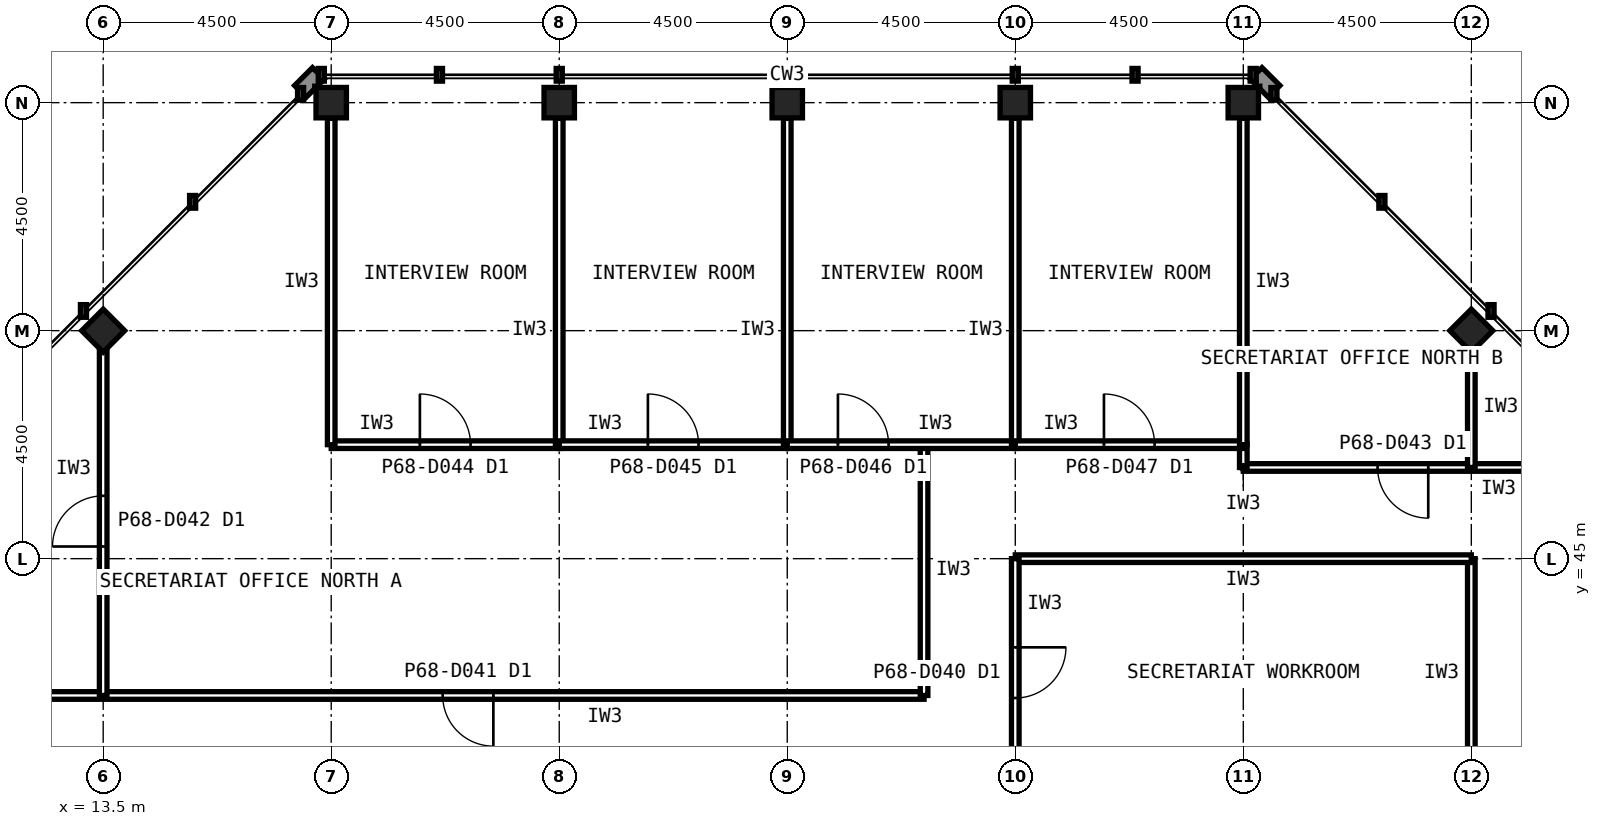
"""IFC4 building model, lengths in metres.
Left out: names, types, materials, properties, quantities, classifications, styles, units other than length and angle.
Written with IfcOpenShell. Run it as: python <this file> out.ifc"""

import sys

from ifc_helpers import new_model, si_unit, direction, frame, frame_2d, origin, origin_2d, place, context, subcontext, project, spatial, rectangle, hollow_rectangle, extrude, element, fill, save


model = new_model("IFC4")
c1 = context("Model", 3, precision=1e-05, world=origin(), true_north=direction((0.0, 1.0)))
c2 = subcontext(c1, "Body", "Model", "MODEL_VIEW")
j1 = project(units=[si_unit("LENGTHUNIT", "METRE"), si_unit("PLANEANGLEUNIT", "RADIAN")], contexts=[c1])
p1 = place(None, origin())
s1 = spatial("IfcSite", under=j1, at=p1, CompositionType="ELEMENT")
p2 = place(p1, origin())
s2 = spatial("IfcBuilding", under=s1, at=p2, CompositionType="ELEMENT")
p3 = place(p2, frame((0.0, 0.0, 286.6)))
s3 = spatial("IfcBuildingStorey", under=s2, at=p3, CompositionType="ELEMENT", Elevation=286.6)
for number, where, z_axis, x_axis in (
    (1, (36.0, 54.0, 0.0), (0.0, 0.0, 1.0), (1.0, 0.0, 0.0)),
    (2, (31.5, 54.0, 0.0), (0.0, 0.0, 1.0), (1.0, 0.0, 0.0)),
    (3, (27.0, 54.0, 0.0), (0.0, 0.0, 1.0), (1.0, 0.0, 0.0)),
    (4, (22.5, 54.0, 0.0), (0.0, 0.0, 1.0), (1.0, 0.0, 0.0)),
    (5, (18.0, 54.0, 0.0), (0.0, 0.0, 1.0), (1.0, 0.0, 0.0)),
    (6, (40.5, 49.5, 0.0), (0.0, 0.0, 1.0), (0.707, 0.707, 0.0)),
    (7, (13.5, 49.5, 0.0), (0.0, 0.0, 1.0), (0.707, 0.707, 0.0)),
):
    element("IfcColumn", number, at=place(p3, frame(where, z_axis=z_axis, x_axis=x_axis)), inside=s3, PredefinedType="COLUMN", context=c2, shape_type="SweptSolid", body=[
        extrude(hollow_rectangle(XDim=0.6, YDim=0.6, WallThickness=0.028, at=origin_2d()), origin(), (0.0, 0.0, 1.0), 4.0),
    ])
p4 = place(p3, frame((29.7, 42.3, 0.0), z_axis=(0.0, 0.0, 1.0), x_axis=(-1.0, 0.0, 0.0)))
e8 = element("IfcWall", 8, at=p4, inside=s3, PredefinedType="PARTITIONING", context=c2, shape_type="SweptSolid", body=[
    extrude(rectangle(XDim=18.0, YDim=0.15, at=frame_2d((9.0, 0.0))), origin(), (0.0, 0.0, 1.0), 3.84),
])
p5 = place(p4, frame((8.5, 0.0, 0.0)))
e9 = element("IfcOpeningElement", 9, at=p5, cuts=e8, PredefinedType="OPENING", context=c2, shape_type="SweptSolid", body=[
    extrude(rectangle(XDim=1.0, YDim=2.1, at=frame_2d((0.5, 1.05))), frame((0.0, 0.085, 0.0), z_axis=(0.0, -1.0, 0.0), x_axis=(1.0, 0.0, 0.0)), (0.0, 0.0, 1.0), 0.17),
])
p6 = place(p3, frame((29.7, 47.25, 0.0), z_axis=(0.0, 0.0, 1.0), x_axis=(0.0, -1.0, 0.0)))
e10 = element("IfcWall", 10, at=p6, inside=s3, PredefinedType="PARTITIONING", context=c2, shape_type="SweptSolid", body=[
    extrude(rectangle(XDim=4.95, YDim=0.15, at=frame_2d((2.475, 0.0))), origin(), (0.0, 0.0, 1.0), 3.84),
])
p7 = place(p3, frame((42.3, 46.8, 0.0), z_axis=(0.0, 0.0, 1.0), x_axis=(-1.0, 0.0, 0.0)))
e11 = element("IfcWall", 11, at=p7, inside=s3, PredefinedType="PARTITIONING", context=c2, shape_type="SweptSolid", body=[
    extrude(rectangle(XDim=6.3, YDim=0.15, at=frame_2d((3.15, 0.0))), origin(), (0.0, 0.0, 1.0), 3.84),
])
p8 = place(p7, frame((2.65, 0.0, 0.0)))
e12 = element("IfcOpeningElement", 12, at=p8, cuts=e11, PredefinedType="OPENING", context=c2, shape_type="SweptSolid", body=[
    extrude(rectangle(XDim=1.0, YDim=2.1, at=frame_2d((0.5, 1.05))), frame((0.0, 0.085, 0.0), z_axis=(0.0, -1.0, 0.0), x_axis=(1.0, 0.0, 0.0)), (0.0, 0.0, 1.0), 0.17),
])
p9 = place(p3, frame((36.0, 46.8, 0.0), z_axis=(0.0, 0.0, 1.0), x_axis=(0.0, 1.0, 0.0)))
e13 = element("IfcWall", 13, at=p9, inside=s3, PredefinedType="PARTITIONING", context=c2, shape_type="SweptSolid", body=[
    extrude(rectangle(XDim=0.46, YDim=0.15, at=frame_2d((0.23, 0.0))), origin(), (0.0, 0.0, 1.0), 2.989),
])
p10 = place(p3, frame((40.5, 40.5, 0.0), z_axis=(0.0, 0.0, 1.0), x_axis=(0.0, 1.0, 0.0)))
e14 = element("IfcWall", 14, at=p10, inside=s3, PredefinedType="PARTITIONING", context=c2, shape_type="SweptSolid", body=[
    extrude(rectangle(XDim=4.5, YDim=0.15, at=frame_2d((2.25, 0.0))), origin(), (0.0, 0.0, 1.0), 2.989),
])
p11 = place(p3, frame((40.5, 45.0, 0.0), z_axis=(0.0, 0.0, 1.0), x_axis=(-1.0, 0.0, 0.0)))
e15 = element("IfcWall", 15, at=p11, inside=s3, PredefinedType="PARTITIONING", context=c2, shape_type="SweptSolid", body=[
    extrude(rectangle(XDim=9.0, YDim=0.15, at=frame_2d((4.5, 0.0))), origin(), (0.0, 0.0, 1.0), 3.84),
])
p12 = place(p3, frame((31.5, 45.0, 0.0), z_axis=(0.0, 0.0, 1.0), x_axis=(0.0, -1.0, 0.0)))
e16 = element("IfcWall", 16, at=p12, inside=s3, PredefinedType="PARTITIONING", context=c2, shape_type="SweptSolid", body=[
    extrude(rectangle(XDim=4.5, YDim=0.15, at=frame_2d((2.25, 0.0))), origin(), (0.0, 0.0, 1.0), 2.989),
])
p13 = place(p12, frame((1.75, 0.0, 0.0)))
e17 = element("IfcOpeningElement", 17, at=p13, cuts=e16, PredefinedType="OPENING", context=c2, shape_type="SweptSolid", body=[
    extrude(rectangle(XDim=1.0, YDim=2.1, at=frame_2d((0.5, 1.05))), frame((0.0, 0.085, 0.0), z_axis=(0.0, -1.0, 0.0), x_axis=(1.0, 0.0, 0.0)), (0.0, 0.0, 1.0), 0.17),
])
p14 = place(p3, frame((18.0, 47.25, 0.0), z_axis=(0.0, 0.0, 1.0), x_axis=(1.0, 0.0, 0.0)))
e18 = element("IfcWall", 18, at=p14, inside=s3, PredefinedType="PARTITIONING", context=c2, shape_type="SweptSolid", body=[
    extrude(rectangle(XDim=4.5, YDim=0.15, at=frame_2d((2.25, 0.0))), origin(), (0.0, 0.0, 1.0), 3.84),
])
p15 = place(p14, frame((1.75, 0.0, 0.0)))
e19 = element("IfcOpeningElement", 19, at=p15, cuts=e18, PredefinedType="OPENING", context=c2, shape_type="SweptSolid", body=[
    extrude(rectangle(XDim=1.0, YDim=2.1, at=frame_2d((0.5, 1.05))), frame((0.0, 0.085, 0.0), z_axis=(0.0, -1.0, 0.0), x_axis=(1.0, 0.0, 0.0)), (0.0, 0.0, 1.0), 0.17),
])
for number, where, z_axis, x_axis in (
    (20, (22.5, 47.25, 0.0), (0.0, 0.0, 1.0), (0.0, 1.0, 0.0)),
    (21, (18.0, 53.69, 0.0), (0.0, 0.0, 1.0), (0.0, -1.0, 0.0)),
):
    element("IfcWall", number, at=place(p3, frame(where, z_axis=z_axis, x_axis=x_axis)), inside=s3, PredefinedType="PARTITIONING", context=c2, shape_type="SweptSolid", body=[
        extrude(rectangle(XDim=6.44, YDim=0.15, at=frame_2d((3.22, 0.0))), origin(), (0.0, 0.0, 1.0), 2.989),
    ])
p16 = place(p3, frame((22.5, 47.25, 0.0), z_axis=(0.0, 0.0, 1.0), x_axis=(1.0, 0.0, 0.0)))
e22 = element("IfcWall", 22, at=p16, inside=s3, PredefinedType="PARTITIONING", context=c2, shape_type="SweptSolid", body=[
    extrude(rectangle(XDim=4.5, YDim=0.15, at=frame_2d((2.25, 0.0))), origin(), (0.0, 0.0, 1.0), 3.84),
])
p17 = place(p16, frame((1.75, 0.0, 0.0)))
e23 = element("IfcOpeningElement", 23, at=p17, cuts=e22, PredefinedType="OPENING", context=c2, shape_type="SweptSolid", body=[
    extrude(rectangle(XDim=1.0, YDim=2.1, at=frame_2d((0.5, 1.05))), frame((0.0, 0.085, 0.0), z_axis=(0.0, -1.0, 0.0), x_axis=(1.0, 0.0, 0.0)), (0.0, 0.0, 1.0), 0.17),
])
p18 = place(p3, frame((27.0, 47.25, 0.0), z_axis=(0.0, 0.0, 1.0), x_axis=(0.0, 1.0, 0.0)))
e24 = element("IfcWall", 24, at=p18, inside=s3, PredefinedType="PARTITIONING", context=c2, shape_type="SweptSolid", body=[
    extrude(rectangle(XDim=6.44, YDim=0.15, at=frame_2d((3.22, 0.0))), origin(), (0.0, 0.0, 1.0), 2.989),
])
p19 = place(p3, frame((27.0, 47.25, 0.0), z_axis=(0.0, 0.0, 1.0), x_axis=(1.0, 0.0, 0.0)))
e25 = element("IfcWall", 25, at=p19, inside=s3, PredefinedType="PARTITIONING", context=c2, shape_type="SweptSolid", body=[
    extrude(rectangle(XDim=4.5, YDim=0.15, at=frame_2d((2.25, 0.0))), origin(), (0.0, 0.0, 1.0), 3.84),
])
p20 = place(p19, frame((1.0, 0.0, 0.0)))
e26 = element("IfcOpeningElement", 26, at=p20, cuts=e25, PredefinedType="OPENING", context=c2, shape_type="SweptSolid", body=[
    extrude(rectangle(XDim=1.0, YDim=2.1, at=frame_2d((0.5, 1.05))), frame((0.0, 0.085, 0.0), z_axis=(0.0, -1.0, 0.0), x_axis=(1.0, 0.0, 0.0)), (0.0, 0.0, 1.0), 0.17),
])
p21 = place(p3, frame((31.5, 47.25, 0.0), z_axis=(0.0, 0.0, 1.0), x_axis=(0.0, 1.0, 0.0)))
e27 = element("IfcWall", 27, at=p21, inside=s3, PredefinedType="PARTITIONING", context=c2, shape_type="SweptSolid", body=[
    extrude(rectangle(XDim=6.44, YDim=0.15, at=frame_2d((3.22, 0.0))), origin(), (0.0, 0.0, 1.0), 2.989),
])
p22 = place(p3, frame((31.5, 47.25, 0.0), z_axis=(0.0, 0.0, 1.0), x_axis=(1.0, 0.0, 0.0)))
e28 = element("IfcWall", 28, at=p22, inside=s3, PredefinedType="PARTITIONING", context=c2, shape_type="SweptSolid", body=[
    extrude(rectangle(XDim=4.5, YDim=0.15, at=frame_2d((2.25, 0.0))), origin(), (0.0, 0.0, 1.0), 3.84),
])
p23 = place(p22, frame((1.75, 0.0, 0.0)))
e29 = element("IfcOpeningElement", 29, at=p23, cuts=e28, PredefinedType="OPENING", context=c2, shape_type="SweptSolid", body=[
    extrude(rectangle(XDim=1.0, YDim=2.1, at=frame_2d((0.5, 1.05))), frame((0.0, 0.085, 0.0), z_axis=(0.0, -1.0, 0.0), x_axis=(1.0, 0.0, 0.0)), (0.0, 0.0, 1.0), 0.17),
])
p24 = place(p3, frame((36.0, 47.25, 0.0), z_axis=(0.0, 0.0, 1.0), x_axis=(0.0, 1.0, 0.0)))
e30 = element("IfcWall", 30, at=p24, inside=s3, PredefinedType="PARTITIONING", context=c2, shape_type="SweptSolid", body=[
    extrude(rectangle(XDim=6.44, YDim=0.15, at=frame_2d((3.22, 0.0))), origin(), (0.0, 0.0, 1.0), 2.989),
])
p25 = place(p3, frame((13.5, 42.3, 0.0), z_axis=(0.0, 0.0, 1.0), x_axis=(0.0, 1.0, 0.0)))
e31 = element("IfcWall", 31, at=p25, inside=s3, PredefinedType="PARTITIONING", context=c2, shape_type="SweptSolid", body=[
    extrude(rectangle(XDim=6.88, YDim=0.15, at=frame_2d((3.44, 0.0))), origin(), (0.0, 0.0, 1.0), 2.989),
])
p26 = place(p25, frame((2.94, 0.0, 0.0)))
e32 = element("IfcOpeningElement", 32, at=p26, cuts=e31, PredefinedType="OPENING", context=c2, shape_type="SweptSolid", body=[
    extrude(rectangle(XDim=1.0, YDim=2.1, at=frame_2d((0.5, 1.05))), frame((0.0, 0.085, 0.0), z_axis=(0.0, -1.0, 0.0), x_axis=(1.0, 0.0, 0.0)), (0.0, 0.0, 1.0), 0.17),
])
p27 = place(p3, frame((40.5, 49.18, 0.0), z_axis=(0.0, 0.0, 1.0), x_axis=(0.0, -1.0, 0.0)))
e33 = element("IfcWall", 33, at=p27, inside=s3, PredefinedType="PARTITIONING", context=c2, shape_type="SweptSolid", body=[
    extrude(rectangle(XDim=2.38, YDim=0.15, at=frame_2d((1.19, 0.0))), origin(), (0.0, 0.0, 1.0), 2.989),
])
p28 = place(p5, origin())
e34 = element("IfcDoor", 34, at=p28, inside=s3, OperationType="SINGLE_SWING_LEFT", PredefinedType="DOOR", context=c2, shape_type="SweptSolid", body=[
    extrude(rectangle(XDim=1.0, YDim=2.1, at=frame_2d((0.5, 1.05))), frame((0.0, 0.025, 0.0), z_axis=(0.0, -1.0, 0.0), x_axis=(1.0, 0.0, 0.0)), (0.0, 0.0, 1.0), 0.05),
])
fill(e9, e34)
p29 = place(p8, origin())
e35 = element("IfcDoor", 35, at=p29, inside=s3, OperationType="SINGLE_SWING_LEFT", PredefinedType="DOOR", context=c2, shape_type="SweptSolid", body=[
    extrude(rectangle(XDim=1.0, YDim=2.1, at=frame_2d((0.5, 1.05))), frame((0.0, 0.025, 0.0), z_axis=(0.0, -1.0, 0.0), x_axis=(1.0, 0.0, 0.0)), (0.0, 0.0, 1.0), 0.05),
])
fill(e12, e35)
p30 = place(p13, origin())
e36 = element("IfcDoor", 36, at=p30, inside=s3, OperationType="SINGLE_SWING_LEFT", PredefinedType="DOOR", context=c2, shape_type="SweptSolid", body=[
    extrude(rectangle(XDim=1.0, YDim=2.1, at=frame_2d((0.5, 1.05))), frame((0.0, 0.025, 0.0), z_axis=(0.0, -1.0, 0.0), x_axis=(1.0, 0.0, 0.0)), (0.0, 0.0, 1.0), 0.05),
])
fill(e17, e36)
p31 = place(p15, origin())
e37 = element("IfcDoor", 37, at=p31, inside=s3, OperationType="SINGLE_SWING_LEFT", PredefinedType="DOOR", context=c2, shape_type="SweptSolid", body=[
    extrude(rectangle(XDim=1.0, YDim=2.1, at=frame_2d((0.5, 1.05))), frame((0.0, 0.025, 0.0), z_axis=(0.0, -1.0, 0.0), x_axis=(1.0, 0.0, 0.0)), (0.0, 0.0, 1.0), 0.05),
])
fill(e19, e37)
p32 = place(p17, origin())
e38 = element("IfcDoor", 38, at=p32, inside=s3, OperationType="SINGLE_SWING_LEFT", PredefinedType="DOOR", context=c2, shape_type="SweptSolid", body=[
    extrude(rectangle(XDim=1.0, YDim=2.1, at=frame_2d((0.5, 1.05))), frame((0.0, 0.025, 0.0), z_axis=(0.0, -1.0, 0.0), x_axis=(1.0, 0.0, 0.0)), (0.0, 0.0, 1.0), 0.05),
])
fill(e23, e38)
p33 = place(p20, origin())
e39 = element("IfcDoor", 39, at=p33, inside=s3, OperationType="SINGLE_SWING_LEFT", PredefinedType="DOOR", context=c2, shape_type="SweptSolid", body=[
    extrude(rectangle(XDim=1.0, YDim=2.1, at=frame_2d((0.5, 1.05))), frame((0.0, 0.025, 0.0), z_axis=(0.0, -1.0, 0.0), x_axis=(1.0, 0.0, 0.0)), (0.0, 0.0, 1.0), 0.05),
])
fill(e26, e39)
p34 = place(p23, origin())
e40 = element("IfcDoor", 40, at=p34, inside=s3, OperationType="SINGLE_SWING_LEFT", PredefinedType="DOOR", context=c2, shape_type="SweptSolid", body=[
    extrude(rectangle(XDim=1.0, YDim=2.1, at=frame_2d((0.5, 1.05))), frame((0.0, 0.025, 0.0), z_axis=(0.0, -1.0, 0.0), x_axis=(1.0, 0.0, 0.0)), (0.0, 0.0, 1.0), 0.05),
])
fill(e29, e40)
p35 = place(p26, origin())
e41 = element("IfcDoor", 41, at=p35, inside=s3, OperationType="SINGLE_SWING_LEFT", PredefinedType="DOOR", context=c2, shape_type="SweptSolid", body=[
    extrude(rectangle(XDim=1.0, YDim=2.1, at=frame_2d((0.5, 1.05))), frame((0.0, 0.025, 0.0), z_axis=(0.0, -1.0, 0.0), x_axis=(1.0, 0.0, 0.0)), (0.0, 0.0, 1.0), 0.05),
])
fill(e32, e41)
save(model, sys.argv[1])
